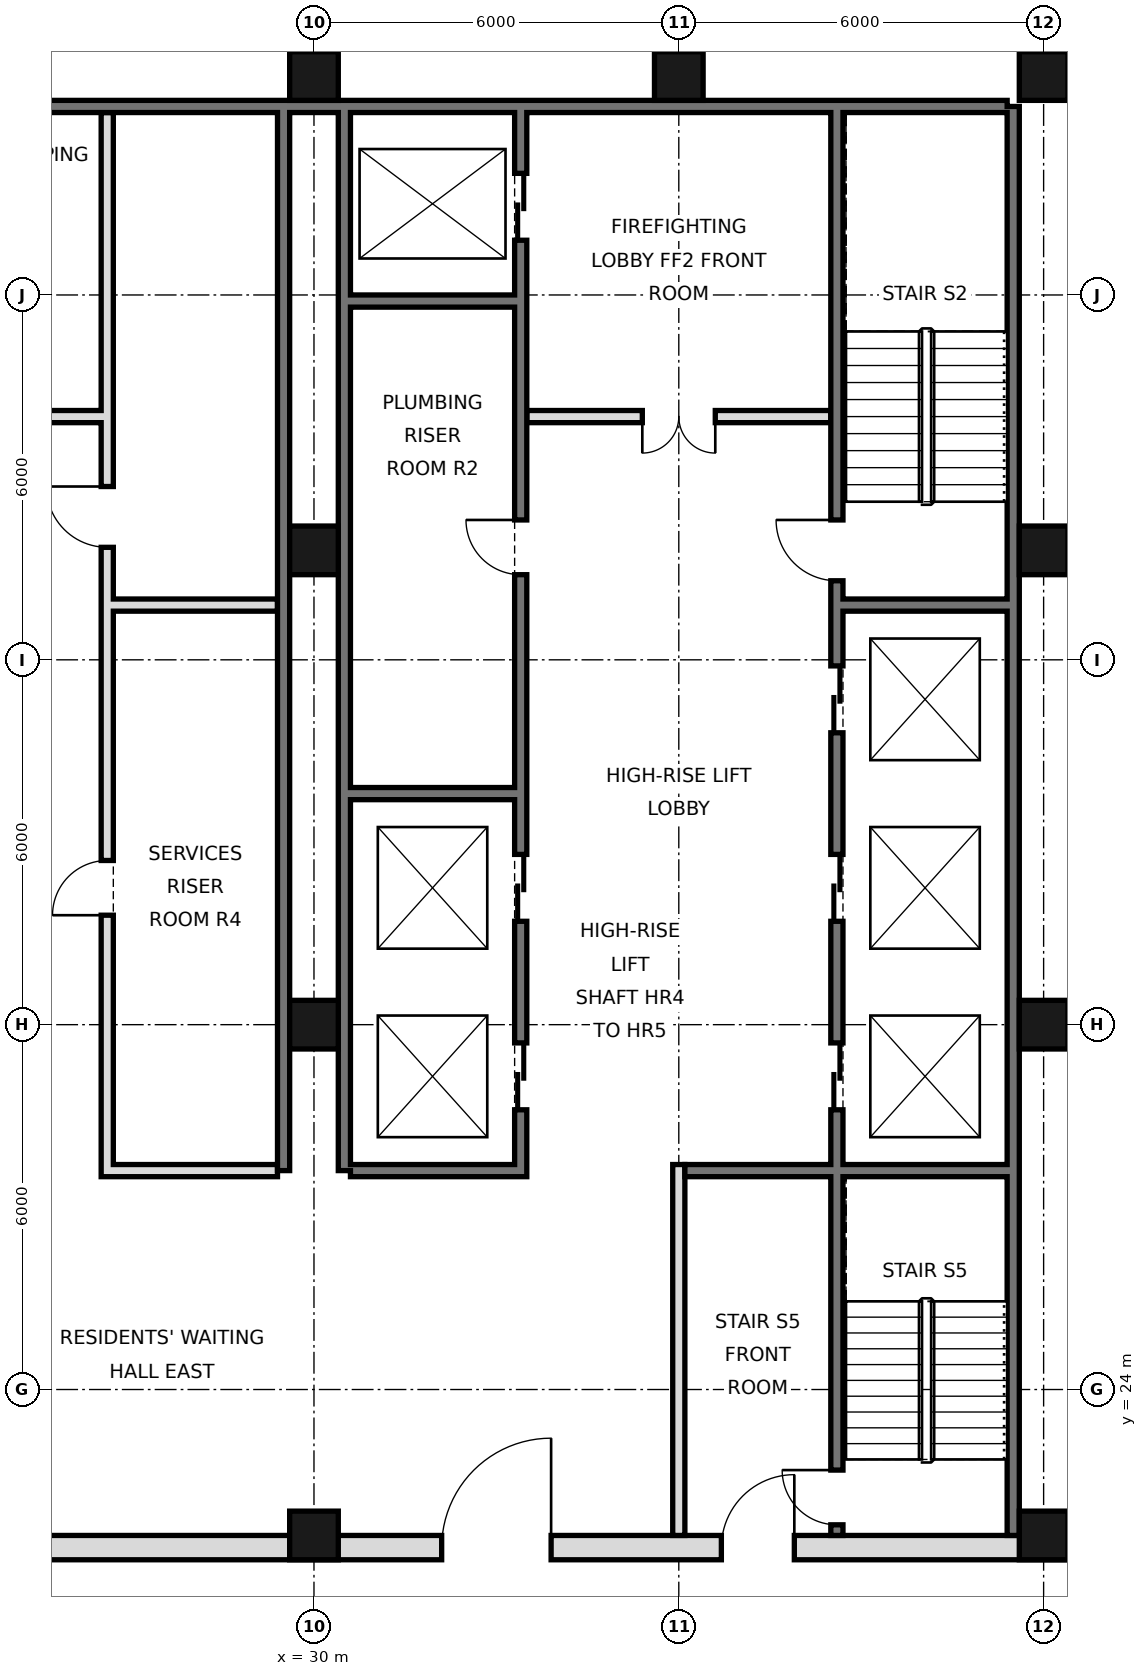
"""IFC4 building model, lengths in metres.
Left out: names, types, materials, properties, quantities, classifications, styles, units other than length and angle.
Written with IfcOpenShell. Run it as: python <this file> out.ifc"""

import sys

from ifc_helpers import new_model, si_unit, direction, frame, frame_2d, origin, origin_2d, place, context, subcontext, project, spatial, rectangle, hollow_rectangle, extrude, element, fill, save


model = new_model("IFC4")
c1 = context("Model", 3, precision=1e-05, world=origin(), true_north=direction((0.0, 1.0)))
c2 = subcontext(c1, "Body", "Model", "MODEL_VIEW")
j1 = project(units=[si_unit("LENGTHUNIT", "METRE"), si_unit("PLANEANGLEUNIT", "RADIAN")], contexts=[c1])
p1 = place(None, origin())
s1 = spatial("IfcSite", under=j1, at=p1, CompositionType="ELEMENT")
p2 = place(p1, origin())
s2 = spatial("IfcBuilding", under=s1, at=p2, CompositionType="ELEMENT")
p3 = place(p2, frame((0.0, 0.0, 243.2)))
s3 = spatial("IfcBuildingStorey", under=s2, at=p3, CompositionType="ELEMENT", Elevation=243.2)
for number, where, z_axis, x_axis in (
    (1, (30.0, 21.6, 0.0), (0.0, 0.0, 1.0), (1.0, 0.0, 0.0)),
    (2, (30.0, 30.0, 0.0), (0.0, 0.0, 1.0), (1.0, 0.0, 0.0)),
    (3, (30.0, 37.8, 0.0), (0.0, 0.0, 1.0), (1.0, 0.0, 0.0)),
    (4, (30.0, 45.6, 0.0), (0.0, 0.0, 1.0), (1.0, 0.0, 0.0)),
    (5, (36.0, 45.6, 0.0), (0.0, 0.0, 1.0), (1.0, 0.0, 0.0)),
    (6, (42.0, 21.6, 0.0), (0.0, 0.0, 1.0), (1.0, 0.0, 0.0)),
    (7, (42.0, 30.0, 0.0), (0.0, 0.0, 1.0), (1.0, 0.0, 0.0)),
    (8, (42.0, 37.8, 0.0), (0.0, 0.0, 1.0), (1.0, 0.0, 0.0)),
    (9, (42.0, 45.6, 0.0), (0.0, 0.0, 1.0), (1.0, 0.0, 0.0)),
):
    element("IfcColumn", number, at=place(p3, frame(where, z_axis=z_axis, x_axis=x_axis)), inside=s3, PredefinedType="COLUMN", context=c2, shape_type="SweptSolid", body=[
        extrude(hollow_rectangle(XDim=0.8, YDim=0.8, WallThickness=0.04, at=origin_2d()), origin(), (0.0, 0.0, 1.0), 3.6),
    ])
p4 = place(p3, frame((41.5, 21.6, 0.0), z_axis=(0.0, 0.0, 1.0), x_axis=(0.0, 1.0, 0.0)))
e10 = element("IfcWall", 10, at=p4, inside=s3, PredefinedType="SOLIDWALL", context=c2, shape_type="SweptSolid", body=[
    extrude(rectangle(XDim=23.5, YDim=0.2, at=frame_2d((11.75, 0.0))), origin(), (0.0, 0.0, 1.0), 3.42),
])
p5 = place(p3, frame((6.6, 45.1, 0.0), z_axis=(0.0, 0.0, 1.0), x_axis=(1.0, 0.0, 0.0)))
e11 = element("IfcWall", 11, at=p5, inside=s3, PredefinedType="SOLIDWALL", context=c2, shape_type="SweptSolid", body=[
    extrude(rectangle(XDim=34.8, YDim=0.2, at=frame_2d((17.4, 0.0))), origin(), (0.0, 0.0, 1.0), 3.42),
])
for number, where, z_axis, x_axis in (
    (12, (29.5, 27.6, 0.0), (0.0, 0.0, 1.0), (0.0, 1.0, 0.0)),
    (13, (30.5, 27.6, 0.0), (0.0, 0.0, 1.0), (0.0, 1.0, 0.0)),
):
    element("IfcWall", number, at=place(p3, frame(where, z_axis=z_axis, x_axis=x_axis)), inside=s3, PredefinedType="SOLIDWALL", context=c2, shape_type="SweptSolid", body=[
        extrude(rectangle(XDim=17.5, YDim=0.2, at=frame_2d((8.75, 0.0))), origin(), (0.0, 0.0, 1.0), 3.42),
    ])
p6 = place(p3, frame((5.6, 21.4, 0.0), z_axis=(0.0, 0.0, 1.0), x_axis=(1.0, 0.0, 0.0)))
e14 = element("IfcWall", 14, at=p6, inside=s3, PredefinedType="SOLIDWALL", context=c2, shape_type="SweptSolid", body=[
    extrude(rectangle(XDim=36.8, YDim=0.4, at=frame_2d((18.4, 0.0))), origin(), (0.0, 0.0, 1.0), 3.42),
])
p7 = place(p6, frame((8.5, 0.0, 0.0)))
e15 = element("IfcOpeningElement", 15, at=p7, cuts=e14, PredefinedType="OPENING", context=c2, shape_type="SweptSolid", body=[
    extrude(rectangle(XDim=1.8, YDim=2.1, at=frame_2d((0.9, 1.05))), frame((0.0, 0.21, 0.0), z_axis=(0.0, -1.0, 0.0), x_axis=(1.0, 0.0, 0.0)), (0.0, 0.0, 1.0), 0.42),
])
p8 = place(p6, frame((17.5, 0.0, 0.0)))
e16 = element("IfcOpeningElement", 16, at=p8, cuts=e14, PredefinedType="OPENING", context=c2, shape_type="SweptSolid", body=[
    extrude(rectangle(XDim=1.8, YDim=2.1, at=frame_2d((0.9, 1.05))), frame((0.0, 0.21, 0.0), z_axis=(0.0, -1.0, 0.0), x_axis=(1.0, 0.0, 0.0)), (0.0, 0.0, 1.0), 0.42),
])
p9 = place(p6, frame((26.5, 0.0, 0.0)))
e17 = element("IfcOpeningElement", 17, at=p9, cuts=e14, PredefinedType="OPENING", context=c2, shape_type="SweptSolid", body=[
    extrude(rectangle(XDim=1.8, YDim=2.1, at=frame_2d((0.9, 1.05))), frame((0.0, 0.21, 0.0), z_axis=(0.0, -1.0, 0.0), x_axis=(1.0, 0.0, 0.0)), (0.0, 0.0, 1.0), 0.42),
])
p10 = place(p6, frame((4.5, 0.0, 0.0)))
e18 = element("IfcOpeningElement", 18, at=p10, cuts=e14, PredefinedType="OPENING", context=c2, shape_type="SweptSolid", body=[
    extrude(rectangle(XDim=1.2, YDim=2.1, at=frame_2d((0.6, 1.05))), frame((0.0, 0.21, 0.0), z_axis=(0.0, -1.0, 0.0), x_axis=(1.0, 0.0, 0.0)), (0.0, 0.0, 1.0), 0.42),
])
p11 = place(p6, frame((31.1, 0.0, 0.0)))
e19 = element("IfcOpeningElement", 19, at=p11, cuts=e14, PredefinedType="OPENING", context=c2, shape_type="SweptSolid", body=[
    extrude(rectangle(XDim=1.2, YDim=2.1, at=frame_2d((0.6, 1.05))), frame((0.0, 0.21, 0.0), z_axis=(0.0, -1.0, 0.0), x_axis=(1.0, 0.0, 0.0)), (0.0, 0.0, 1.0), 0.42),
])
p12 = place(p3, frame((26.6, 27.5, 0.0), z_axis=(0.0, 0.0, 1.0), x_axis=(0.0, 1.0, 0.0)))
e20 = element("IfcWall", 20, at=p12, inside=s3, PredefinedType="SOLIDWALL", context=c2, shape_type="SweptSolid", body=[
    extrude(rectangle(XDim=17.5, YDim=0.2, at=frame_2d((8.75, 0.0))), origin(), (0.0, 0.0, 1.0), 3.42),
])
p13 = place(p12, frame((4.3, 0.0, 0.0)))
e21 = element("IfcOpeningElement", 21, at=p13, cuts=e20, PredefinedType="OPENING", context=c2, shape_type="SweptSolid", body=[
    extrude(rectangle(XDim=0.9, YDim=2.1, at=frame_2d((0.45, 1.05))), frame((0.0, 0.11, 0.0), z_axis=(0.0, -1.0, 0.0), x_axis=(1.0, 0.0, 0.0)), (0.0, 0.0, 1.0), 0.22),
])
p14 = place(p12, frame((10.35, 0.0, 0.0)))
e22 = element("IfcOpeningElement", 22, at=p14, cuts=e20, PredefinedType="OPENING", context=c2, shape_type="SweptSolid", body=[
    extrude(rectangle(XDim=1.0, YDim=2.1, at=frame_2d((0.5, 1.05))), frame((0.0, 0.11, 0.0), z_axis=(0.0, -1.0, 0.0), x_axis=(1.0, 0.0, 0.0)), (0.0, 0.0, 1.0), 0.22),
])
p15 = place(p3, frame((33.4, 27.5, 0.0), z_axis=(0.0, 0.0, 1.0), x_axis=(0.0, 1.0, 0.0)))
e23 = element("IfcWall", 23, at=p15, inside=s3, PredefinedType="SOLIDWALL", context=c2, shape_type="SweptSolid", body=[
    extrude(rectangle(XDim=17.5, YDim=0.2, at=frame_2d((8.75, 0.0))), origin(), (0.0, 0.0, 1.0), 3.42),
])
p16 = place(p15, frame((1.1, 0.0, 0.0)))
e24 = element("IfcOpeningElement", 24, at=p16, cuts=e23, PredefinedType="OPENING", context=c2, shape_type="SweptSolid", body=[
    extrude(rectangle(XDim=1.1, YDim=2.1, at=frame_2d((0.55, 1.05))), frame((0.0, 0.11, 0.0), z_axis=(0.0, -1.0, 0.0), x_axis=(1.0, 0.0, 0.0)), (0.0, 0.0, 1.0), 0.22),
])
p17 = place(p15, frame((4.2, 0.0, 0.0)))
e25 = element("IfcOpeningElement", 25, at=p17, cuts=e23, PredefinedType="OPENING", context=c2, shape_type="SweptSolid", body=[
    extrude(rectangle(XDim=1.1, YDim=2.1, at=frame_2d((0.55, 1.05))), frame((0.0, 0.11, 0.0), z_axis=(0.0, -1.0, 0.0), x_axis=(1.0, 0.0, 0.0)), (0.0, 0.0, 1.0), 0.22),
])
p18 = place(p15, frame((15.4, 0.0, 0.0)))
e26 = element("IfcOpeningElement", 26, at=p18, cuts=e23, PredefinedType="OPENING", context=c2, shape_type="SweptSolid", body=[
    extrude(rectangle(XDim=1.1, YDim=2.1, at=frame_2d((0.55, 1.05))), frame((0.0, 0.11, 0.0), z_axis=(0.0, -1.0, 0.0), x_axis=(1.0, 0.0, 0.0)), (0.0, 0.0, 1.0), 0.22),
])
p19 = place(p15, frame((9.9, 0.0, 0.0)))
e27 = element("IfcOpeningElement", 27, at=p19, cuts=e23, PredefinedType="OPENING", context=c2, shape_type="SweptSolid", body=[
    extrude(rectangle(XDim=0.9, YDim=2.1, at=frame_2d((0.45, 1.05))), frame((0.0, 0.11, 0.0), z_axis=(0.0, -1.0, 0.0), x_axis=(1.0, 0.0, 0.0)), (0.0, 0.0, 1.0), 0.22),
])
p20 = place(p3, frame((36.0, 21.6, 0.0), z_axis=(0.0, 0.0, 1.0), x_axis=(0.0, 1.0, 0.0)))
e28 = element("IfcWall", 28, at=p20, inside=s3, PredefinedType="PARTITIONING", context=c2, shape_type="SweptSolid", body=[
    extrude(rectangle(XDim=6.1, YDim=0.2, at=frame_2d((3.05, 0.0))), origin(), (0.0, 0.0, 1.0), 3.42),
])
p21 = place(p3, frame((38.6, 21.6, 0.0), z_axis=(0.0, 0.0, 1.0), x_axis=(0.0, 1.0, 0.0)))
e29 = element("IfcWall", 29, at=p21, inside=s3, PredefinedType="SOLIDWALL", context=c2, shape_type="SweptSolid", body=[
    extrude(rectangle(XDim=23.4, YDim=0.2, at=frame_2d((11.7, 0.0))), origin(), (0.0, 0.0, 1.0), 3.42),
])
p22 = place(p21, frame((7.0, 0.0, 0.0)))
e30 = element("IfcOpeningElement", 30, at=p22, cuts=e29, PredefinedType="OPENING", context=c2, shape_type="SweptSolid", body=[
    extrude(rectangle(XDim=1.1, YDim=2.1, at=frame_2d((0.55, 1.05))), frame((0.0, 0.11, 0.0), z_axis=(0.0, -1.0, 0.0), x_axis=(1.0, 0.0, 0.0)), (0.0, 0.0, 1.0), 0.22),
])
p23 = place(p21, frame((10.1, 0.0, 0.0)))
e31 = element("IfcOpeningElement", 31, at=p23, cuts=e29, PredefinedType="OPENING", context=c2, shape_type="SweptSolid", body=[
    extrude(rectangle(XDim=1.1, YDim=2.1, at=frame_2d((0.55, 1.05))), frame((0.0, 0.11, 0.0), z_axis=(0.0, -1.0, 0.0), x_axis=(1.0, 0.0, 0.0)), (0.0, 0.0, 1.0), 0.22),
])
p24 = place(p21, frame((13.2, 0.0, 0.0)))
e32 = element("IfcOpeningElement", 32, at=p24, cuts=e29, PredefinedType="OPENING", context=c2, shape_type="SweptSolid", body=[
    extrude(rectangle(XDim=1.1, YDim=2.1, at=frame_2d((0.55, 1.05))), frame((0.0, 0.11, 0.0), z_axis=(0.0, -1.0, 0.0), x_axis=(1.0, 0.0, 0.0)), (0.0, 0.0, 1.0), 0.22),
])
p25 = place(p21, frame((15.7, 0.0, 0.0)))
e33 = element("IfcOpeningElement", 33, at=p25, cuts=e29, PredefinedType="OPENING", context=c2, shape_type="SweptSolid", body=[
    extrude(rectangle(XDim=1.0, YDim=2.1, at=frame_2d((0.5, 1.05))), frame((0.0, 0.11, 0.0), z_axis=(0.0, -1.0, 0.0), x_axis=(1.0, 0.0, 0.0)), (0.0, 0.0, 1.0), 0.22),
])
p26 = place(p21, frame((0.175, 0.0, 0.0)))
e34 = element("IfcOpeningElement", 34, at=p26, cuts=e29, PredefinedType="OPENING", context=c2, shape_type="SweptSolid", body=[
    extrude(rectangle(XDim=0.9, YDim=2.1, at=frame_2d((0.45, 1.05))), frame((0.0, 0.11, 0.0), z_axis=(0.0, -1.0, 0.0), x_axis=(1.0, 0.0, 0.0)), (0.0, 0.0, 1.0), 0.22),
])
for number, where, z_axis, x_axis in (
    (35, (26.7, 27.6, 0.0), (0.0, 0.0, 1.0), (1.0, 0.0, 0.0)),
    (36, (30.6, 27.6, 0.0), (0.0, 0.0, 1.0), (1.0, 0.0, 0.0)),
):
    element("IfcWall", number, at=place(p3, frame(where, z_axis=z_axis, x_axis=x_axis)), inside=s3, PredefinedType="SOLIDWALL", context=c2, shape_type="SweptSolid", body=[
        extrude(rectangle(XDim=2.7, YDim=0.2, at=frame_2d((1.35, 0.0))), origin(), (0.0, 0.0, 1.0), 3.42),
    ])
p27 = place(p3, frame((36.1, 27.6, 0.0), z_axis=(0.0, 0.0, 1.0), x_axis=(1.0, 0.0, 0.0)))
e37 = element("IfcWall", 37, at=p27, inside=s3, PredefinedType="SOLIDWALL", context=c2, shape_type="SweptSolid", body=[
    extrude(rectangle(XDim=5.3, YDim=0.2, at=frame_2d((2.65, 0.0))), origin(), (0.0, 0.0, 1.0), 3.42),
])
for number, where, z_axis, x_axis in (
    (38, (30.6, 33.8, 0.0), (0.0, 0.0, 1.0), (1.0, 0.0, 0.0)),
    (39, (26.7, 36.9, 0.0), (0.0, 0.0, 1.0), (1.0, 0.0, 0.0)),
    (40, (38.7, 36.9, 0.0), (0.0, 0.0, 1.0), (1.0, 0.0, 0.0)),
):
    element("IfcWall", number, at=place(p3, frame(where, z_axis=z_axis, x_axis=x_axis)), inside=s3, PredefinedType="SOLIDWALL", context=c2, shape_type="SweptSolid", body=[
        extrude(rectangle(XDim=2.7, YDim=0.2, at=frame_2d((1.35, 0.0))), origin(), (0.0, 0.0, 1.0), 3.42),
    ])
p28 = place(p3, frame((21.5, 40.0, 0.0), z_axis=(0.0, 0.0, 1.0), x_axis=(1.0, 0.0, 0.0)))
e41 = element("IfcWall", 41, at=p28, inside=s3, PredefinedType="PARTITIONING", context=c2, shape_type="SweptSolid", body=[
    extrude(rectangle(XDim=5.0, YDim=0.2, at=frame_2d((2.5, 0.0))), origin(), (0.0, 0.0, 1.0), 3.42),
])
p29 = place(p28, frame((1.9, 0.0, 0.0)))
e42 = element("IfcOpeningElement", 42, at=p29, cuts=e41, PredefinedType="OPENING", context=c2, shape_type="SweptSolid", body=[
    extrude(rectangle(XDim=1.2, YDim=2.1, at=frame_2d((0.6, 1.05))), frame((0.0, 0.11, 0.0), z_axis=(0.0, -1.0, 0.0), x_axis=(1.0, 0.0, 0.0)), (0.0, 0.0, 1.0), 0.22),
])
p30 = place(p3, frame((33.5, 40.0, 0.0), z_axis=(0.0, 0.0, 1.0), x_axis=(1.0, 0.0, 0.0)))
e43 = element("IfcWall", 43, at=p30, inside=s3, PredefinedType="PARTITIONING", context=c2, shape_type="SweptSolid", body=[
    extrude(rectangle(XDim=5.0, YDim=0.2, at=frame_2d((2.5, 0.0))), origin(), (0.0, 0.0, 1.0), 3.42),
])
p31 = place(p30, frame((1.9, 0.0, 0.0)))
e44 = element("IfcOpeningElement", 44, at=p31, cuts=e43, PredefinedType="OPENING", context=c2, shape_type="SweptSolid", body=[
    extrude(rectangle(XDim=1.2, YDim=2.1, at=frame_2d((0.6, 1.05))), frame((0.0, 0.11, 0.0), z_axis=(0.0, -1.0, 0.0), x_axis=(1.0, 0.0, 0.0)), (0.0, 0.0, 1.0), 0.22),
])
p32 = place(p3, frame((30.6, 41.9, 0.0), z_axis=(0.0, 0.0, 1.0), x_axis=(1.0, 0.0, 0.0)))
e45 = element("IfcWall", 45, at=p32, inside=s3, PredefinedType="SOLIDWALL", context=c2, shape_type="SweptSolid", body=[
    extrude(rectangle(XDim=2.7, YDim=0.2, at=frame_2d((1.35, 0.0))), origin(), (0.0, 0.0, 1.0), 3.42),
])
p33 = place(p9, frame((1.8, 0.0, 0.0), z_axis=(0.0, 0.0, 1.0), x_axis=(-1.0, 0.0, 0.0)))
e46 = element("IfcDoor", 46, at=p33, inside=s3, OperationType="SINGLE_SWING_LEFT", PredefinedType="DOOR", context=c2, shape_type="SweptSolid", body=[
    extrude(rectangle(XDim=1.8, YDim=2.1, at=frame_2d((0.9, 1.05))), frame((0.0, 0.025, 0.0), z_axis=(0.0, -1.0, 0.0), x_axis=(1.0, 0.0, 0.0)), (0.0, 0.0, 1.0), 0.05),
])
fill(e17, e46)
p34 = place(p11, frame((1.2, 0.0, 0.0), z_axis=(0.0, 0.0, 1.0), x_axis=(-1.0, 0.0, 0.0)))
e47 = element("IfcDoor", 47, at=p34, inside=s3, OperationType="SINGLE_SWING_LEFT", PredefinedType="DOOR", context=c2, shape_type="SweptSolid", body=[
    extrude(rectangle(XDim=1.2, YDim=2.1, at=frame_2d((0.6, 1.05))), frame((0.0, 0.025, 0.0), z_axis=(0.0, -1.0, 0.0), x_axis=(1.0, 0.0, 0.0)), (0.0, 0.0, 1.0), 0.05),
])
fill(e19, e47)
p35 = place(p31, frame((1.2, 0.0, 0.0), z_axis=(0.0, 0.0, 1.0), x_axis=(-1.0, 0.0, 0.0)))
e48 = element("IfcDoor", 48, at=p35, inside=s3, OperationType="DOUBLE_DOOR_SINGLE_SWING", PredefinedType="DOOR", context=c2, shape_type="SweptSolid", body=[
    extrude(rectangle(XDim=1.2, YDim=2.1, at=frame_2d((0.6, 1.05))), frame((0.0, 0.025, 0.0), z_axis=(0.0, -1.0, 0.0), x_axis=(1.0, 0.0, 0.0)), (0.0, 0.0, 1.0), 0.05),
])
fill(e44, e48)
p36 = place(p22, origin())
e49 = element("IfcDoor", 49, at=p36, inside=s3, OperationType="DOUBLE_DOOR_SLIDING", PredefinedType="DOOR", context=c2, shape_type="SweptSolid", body=[
    extrude(rectangle(XDim=1.1, YDim=2.1, at=frame_2d((0.55, 1.05))), frame((0.0, 0.025, 0.0), z_axis=(0.0, -1.0, 0.0), x_axis=(1.0, 0.0, 0.0)), (0.0, 0.0, 1.0), 0.05),
])
fill(e30, e49)
p37 = place(p23, origin())
e50 = element("IfcDoor", 50, at=p37, inside=s3, OperationType="DOUBLE_DOOR_SLIDING", PredefinedType="DOOR", context=c2, shape_type="SweptSolid", body=[
    extrude(rectangle(XDim=1.1, YDim=2.1, at=frame_2d((0.55, 1.05))), frame((0.0, 0.025, 0.0), z_axis=(0.0, -1.0, 0.0), x_axis=(1.0, 0.0, 0.0)), (0.0, 0.0, 1.0), 0.05),
])
fill(e31, e50)
p38 = place(p24, origin())
e51 = element("IfcDoor", 51, at=p38, inside=s3, OperationType="DOUBLE_DOOR_SLIDING", PredefinedType="DOOR", context=c2, shape_type="SweptSolid", body=[
    extrude(rectangle(XDim=1.1, YDim=2.1, at=frame_2d((0.55, 1.05))), frame((0.0, 0.025, 0.0), z_axis=(0.0, -1.0, 0.0), x_axis=(1.0, 0.0, 0.0)), (0.0, 0.0, 1.0), 0.05),
])
fill(e32, e51)
p39 = place(p16, origin())
e52 = element("IfcDoor", 52, at=p39, inside=s3, OperationType="DOUBLE_DOOR_SLIDING", PredefinedType="DOOR", context=c2, shape_type="SweptSolid", body=[
    extrude(rectangle(XDim=1.1, YDim=2.1, at=frame_2d((0.55, 1.05))), frame((0.0, 0.025, 0.0), z_axis=(0.0, -1.0, 0.0), x_axis=(1.0, 0.0, 0.0)), (0.0, 0.0, 1.0), 0.05),
])
fill(e24, e52)
p40 = place(p17, origin())
e53 = element("IfcDoor", 53, at=p40, inside=s3, OperationType="DOUBLE_DOOR_SLIDING", PredefinedType="DOOR", context=c2, shape_type="SweptSolid", body=[
    extrude(rectangle(XDim=1.1, YDim=2.1, at=frame_2d((0.55, 1.05))), frame((0.0, 0.025, 0.0), z_axis=(0.0, -1.0, 0.0), x_axis=(1.0, 0.0, 0.0)), (0.0, 0.0, 1.0), 0.05),
])
fill(e25, e53)
p41 = place(p18, origin())
e54 = element("IfcDoor", 54, at=p41, inside=s3, OperationType="DOUBLE_DOOR_SLIDING", PredefinedType="DOOR", context=c2, shape_type="SweptSolid", body=[
    extrude(rectangle(XDim=1.1, YDim=2.1, at=frame_2d((0.55, 1.05))), frame((0.0, 0.025, 0.0), z_axis=(0.0, -1.0, 0.0), x_axis=(1.0, 0.0, 0.0)), (0.0, 0.0, 1.0), 0.05),
])
fill(e26, e54)
p42 = place(p25, frame((1.0, 0.0, 0.0), z_axis=(0.0, 0.0, 1.0), x_axis=(-1.0, 0.0, 0.0)))
e55 = element("IfcDoor", 55, at=p42, inside=s3, OperationType="SINGLE_SWING_LEFT", PredefinedType="DOOR", context=c2, shape_type="SweptSolid", body=[
    extrude(rectangle(XDim=1.0, YDim=2.1, at=frame_2d((0.5, 1.05))), frame((0.0, 0.025, 0.0), z_axis=(0.0, -1.0, 0.0), x_axis=(1.0, 0.0, 0.0)), (0.0, 0.0, 1.0), 0.05),
])
fill(e33, e55)
p43 = place(p26, frame((0.9, 0.0, 0.0), z_axis=(0.0, 0.0, 1.0), x_axis=(-1.0, 0.0, 0.0)))
e56 = element("IfcDoor", 56, at=p43, inside=s3, OperationType="SINGLE_SWING_LEFT", PredefinedType="DOOR", context=c2, shape_type="SweptSolid", body=[
    extrude(rectangle(XDim=0.9, YDim=2.1, at=frame_2d((0.45, 1.05))), frame((0.0, 0.025, 0.0), z_axis=(0.0, -1.0, 0.0), x_axis=(1.0, 0.0, 0.0)), (0.0, 0.0, 1.0), 0.05),
])
fill(e34, e56)
p44 = place(p19, frame((0.9, 0.0, 0.0), z_axis=(0.0, 0.0, 1.0), x_axis=(-1.0, 0.0, 0.0)))
e57 = element("IfcDoor", 57, at=p44, inside=s3, OperationType="SINGLE_SWING_LEFT", PredefinedType="DOOR", context=c2, shape_type="SweptSolid", body=[
    extrude(rectangle(XDim=0.9, YDim=2.1, at=frame_2d((0.45, 1.05))), frame((0.0, 0.025, 0.0), z_axis=(0.0, -1.0, 0.0), x_axis=(1.0, 0.0, 0.0)), (0.0, 0.0, 1.0), 0.05),
])
fill(e27, e57)
p45 = place(p13, origin())
e58 = element("IfcDoor", 58, at=p45, inside=s3, OperationType="SINGLE_SWING_LEFT", PredefinedType="DOOR", context=c2, shape_type="SweptSolid", body=[
    extrude(rectangle(XDim=0.9, YDim=2.1, at=frame_2d((0.45, 1.05))), frame((0.0, 0.025, 0.0), z_axis=(0.0, -1.0, 0.0), x_axis=(1.0, 0.0, 0.0)), (0.0, 0.0, 1.0), 0.05),
])
fill(e21, e58)
p46 = place(p14, frame((1.0, 0.0, 0.0), z_axis=(0.0, 0.0, 1.0), x_axis=(-1.0, 0.0, 0.0)))
e59 = element("IfcDoor", 59, at=p46, inside=s3, OperationType="SINGLE_SWING_LEFT", PredefinedType="DOOR", context=c2, shape_type="SweptSolid", body=[
    extrude(rectangle(XDim=1.0, YDim=2.1, at=frame_2d((0.5, 1.05))), frame((0.0, 0.025, 0.0), z_axis=(0.0, -1.0, 0.0), x_axis=(1.0, 0.0, 0.0)), (0.0, 0.0, 1.0), 0.05),
])
fill(e22, e59)
save(model, sys.argv[1])
